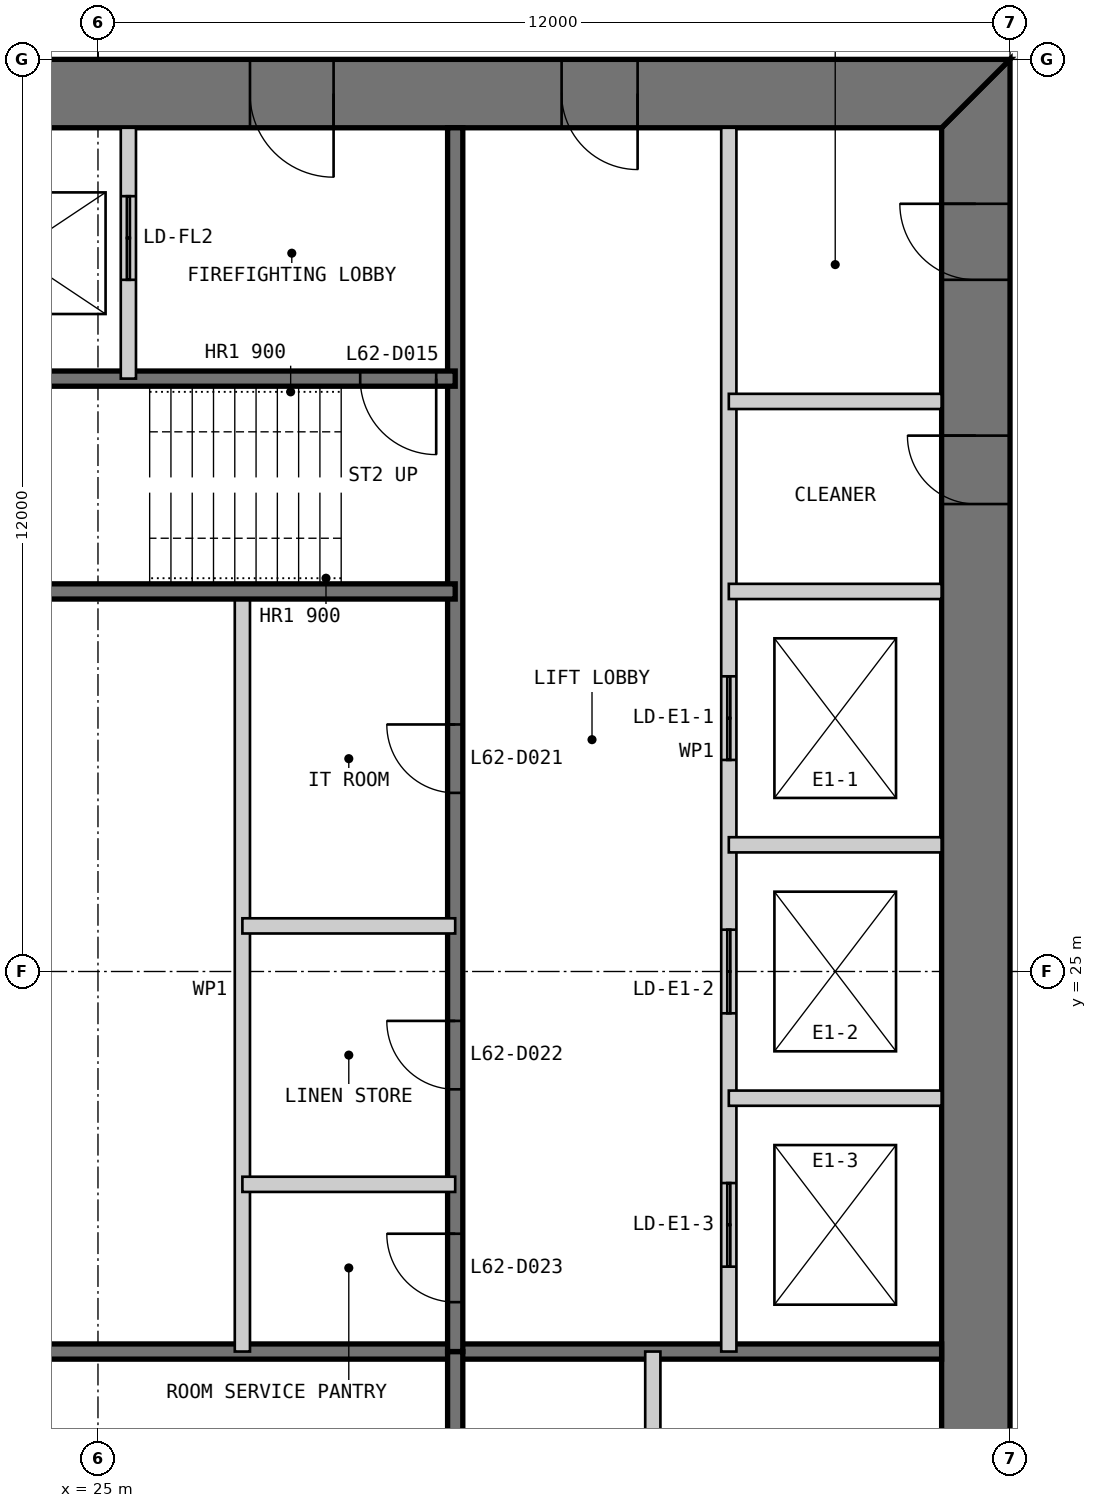
"""IFC4 building model, lengths in metres.
Left out: names, types, materials, properties, quantities, classifications, styles, units other than length and angle.
Written with IfcOpenShell. Run it as: python <this file> out.ifc"""

import sys

from ifc_helpers import new_model, si_unit, direction, frame, frame_2d, origin, place, context, subcontext, project, spatial, polyline, rectangle, outline, extrude, element, fill, save


model = new_model("IFC4")
c1 = context("Model", 3, precision=1e-05, world=origin(), true_north=direction((0.0, 1.0)))
c2 = subcontext(c1, "Body", "Model", "MODEL_VIEW")
j1 = project(units=[si_unit("LENGTHUNIT", "METRE"), si_unit("PLANEANGLEUNIT", "RADIAN")], contexts=[c1])
p1 = place(None, origin())
s1 = spatial("IfcSite", under=j1, at=p1, CompositionType="ELEMENT")
p2 = place(p1, origin())
s2 = spatial("IfcBuilding", under=s1, at=p2, CompositionType="ELEMENT")
p3 = place(p2, frame((0.0, 0.0, 262.8)))
s3 = spatial("IfcBuildingStorey", under=s2, at=p3, CompositionType="ELEMENT", Elevation=262.8)
p4 = place(p3, frame((36.55, 13.9, 0.0), z_axis=(0.0, 0.0, 1.0), x_axis=(0.0, 1.0, 0.0)))
e1 = element("IfcWall", 1, at=p4, inside=s3, PredefinedType="SHEAR", context=c2, shape_type="SweptSolid", body=[
    extrude(outline(polyline([(-0.9, -0.45), (23.1, -0.45), (22.2, 0.45), (0.0, 0.45), (-0.9, -0.45)])), origin(), (0.0, 0.0, 1.0), 3.4),
])
p5 = place(p4, frame((20.2, 0.0, 0.0)))
e2 = element("IfcOpeningElement", 2, at=p5, cuts=e1, PredefinedType="OPENING", context=c2, shape_type="SweptSolid", body=[
    extrude(rectangle(XDim=1.0, YDim=2.2, at=frame_2d((0.5, 1.1))), frame((0.0, 0.46, 0.0), z_axis=(0.0, -1.0, 0.0), x_axis=(1.0, 0.0, 0.0)), (0.0, 0.0, 1.0), 0.92),
])
p6 = place(p4, frame((17.25, 0.0, 0.0)))
e3 = element("IfcOpeningElement", 3, at=p6, cuts=e1, PredefinedType="OPENING", context=c2, shape_type="SweptSolid", body=[
    extrude(rectangle(XDim=0.9, YDim=2.2, at=frame_2d((0.45, 1.1))), frame((0.0, 0.46, 0.0), z_axis=(0.0, -1.0, 0.0), x_axis=(1.0, 0.0, 0.0)), (0.0, 0.0, 1.0), 0.92),
])
p7 = place(p3, frame((37.0, 36.55, 0.0), z_axis=(0.0, 0.0, 1.0), x_axis=(-1.0, 0.0, 0.0)))
e4 = element("IfcWall", 4, at=p7, inside=s3, PredefinedType="SHEAR", context=c2, shape_type="SweptSolid", body=[
    extrude(outline(polyline([(0.0, -0.45), (24.0, -0.45), (23.1, 0.45), (0.9, 0.45), (0.0, -0.45)])), origin(), (0.0, 0.0, 1.0), 3.4),
])
p8 = place(p7, frame((4.9, 0.0, 0.0)))
e5 = element("IfcOpeningElement", 5, at=p8, cuts=e4, PredefinedType="OPENING", context=c2, shape_type="SweptSolid", body=[
    extrude(rectangle(XDim=1.0, YDim=2.2, at=frame_2d((0.5, 1.1))), frame((0.0, 0.46, 0.0), z_axis=(0.0, -1.0, 0.0), x_axis=(1.0, 0.0, 0.0)), (0.0, 0.0, 1.0), 0.92),
])
p9 = place(p7, frame((8.9, 0.0, 0.0)))
e6 = element("IfcOpeningElement", 6, at=p9, cuts=e4, PredefinedType="OPENING", context=c2, shape_type="SweptSolid", body=[
    extrude(rectangle(XDim=1.1, YDim=2.2, at=frame_2d((0.55, 1.1))), frame((0.0, 0.46, 0.0), z_axis=(0.0, -1.0, 0.0), x_axis=(1.0, 0.0, 0.0)), (0.0, 0.0, 1.0), 0.92),
])
p10 = place(p7, frame((15.05, 0.0, 0.0)))
e7 = element("IfcOpeningElement", 7, at=p10, cuts=e4, PredefinedType="OPENING", context=c2, shape_type="SweptSolid", body=[
    extrude(rectangle(XDim=0.9, YDim=2.2, at=frame_2d((0.45, 1.1))), frame((0.0, 0.46, 0.0), z_axis=(0.0, -1.0, 0.0), x_axis=(1.0, 0.0, 0.0)), (0.0, 0.0, 1.0), 0.92),
])
p11 = place(p7, frame((17.9, 0.0, 0.0)))
e8 = element("IfcOpeningElement", 8, at=p11, cuts=e4, PredefinedType="OPENING", context=c2, shape_type="SweptSolid", body=[
    extrude(rectangle(XDim=1.0, YDim=2.2, at=frame_2d((0.5, 1.1))), frame((0.0, 0.46, 0.0), z_axis=(0.0, -1.0, 0.0), x_axis=(1.0, 0.0, 0.0)), (0.0, 0.0, 1.0), 0.92),
])
p12 = place(p7, frame((21.4, 0.0, 0.0)))
e9 = element("IfcOpeningElement", 9, at=p12, cuts=e4, PredefinedType="OPENING", context=c2, shape_type="SweptSolid", body=[
    extrude(rectangle(XDim=1.0, YDim=2.2, at=frame_2d((0.5, 1.1))), frame((0.0, 0.46, 0.0), z_axis=(0.0, -1.0, 0.0), x_axis=(1.0, 0.0, 0.0)), (0.0, 0.0, 1.0), 0.92),
])
p13 = place(p3, frame((20.3, 20.0, 0.0), z_axis=(0.0, 0.0, 1.0), x_axis=(1.0, 0.0, 0.0)))
e10 = element("IfcWall", 10, at=p13, inside=s3, PredefinedType="SOLIDWALL", context=c2, shape_type="SweptSolid", body=[
    extrude(rectangle(XDim=15.8, YDim=0.2, at=frame_2d((7.9, 0.0))), origin(), (0.0, 0.0, 1.0), 3.2),
])
p14 = place(p3, frame((29.7, 13.9, 0.0), z_axis=(0.0, 0.0, 1.0), x_axis=(0.0, 1.0, 0.0)))
e11 = element("IfcWall", 11, at=p14, inside=s3, PredefinedType="SOLIDWALL", context=c2, shape_type="SweptSolid", body=[
    extrude(rectangle(XDim=6.1, YDim=0.2, at=frame_2d((3.05, 0.0))), origin(), (0.0, 0.0, 1.0), 3.2),
])
p15 = place(p3, frame((32.3, 13.9, 0.0), z_axis=(0.0, 0.0, 1.0), x_axis=(0.0, 1.0, 0.0)))
e12 = element("IfcWall", 12, at=p15, inside=s3, PredefinedType="PARTITIONING", context=c2, shape_type="SweptSolid", body=[
    extrude(rectangle(XDim=6.1, YDim=0.2, at=frame_2d((3.05, 0.0))), origin(), (0.0, 0.0, 1.0), 3.2),
])
p16 = place(p3, frame((33.3, 36.1, 0.0), z_axis=(0.0, 0.0, 1.0), x_axis=(0.0, -1.0, 0.0)))
e13 = element("IfcWall", 13, at=p16, inside=s3, PredefinedType="PARTITIONING", context=c2, shape_type="SweptSolid", body=[
    extrude(rectangle(XDim=16.1, YDim=0.2, at=frame_2d((8.05, 0.0))), origin(), (0.0, 0.0, 1.0), 3.2),
])
p17 = place(p16, frame((7.217, 0.0, 0.0)))
e14 = element("IfcOpeningElement", 14, at=p17, cuts=e13, PredefinedType="OPENING", context=c2, shape_type="SweptSolid", body=[
    extrude(rectangle(XDim=1.1, YDim=2.2, at=frame_2d((0.55, 1.1))), frame((0.0, 0.11, 0.0), z_axis=(0.0, -1.0, 0.0), x_axis=(1.0, 0.0, 0.0)), (0.0, 0.0, 1.0), 0.22),
])
p18 = place(p16, frame((10.55, 0.0, 0.0)))
e15 = element("IfcOpeningElement", 15, at=p18, cuts=e13, PredefinedType="OPENING", context=c2, shape_type="SweptSolid", body=[
    extrude(rectangle(XDim=1.1, YDim=2.2, at=frame_2d((0.55, 1.1))), frame((0.0, 0.11, 0.0), z_axis=(0.0, -1.0, 0.0), x_axis=(1.0, 0.0, 0.0)), (0.0, 0.0, 1.0), 0.22),
])
p19 = place(p16, frame((13.883, 0.0, 0.0)))
e16 = element("IfcOpeningElement", 16, at=p19, cuts=e13, PredefinedType="OPENING", context=c2, shape_type="SweptSolid", body=[
    extrude(rectangle(XDim=1.1, YDim=2.2, at=frame_2d((0.55, 1.1))), frame((0.0, 0.11, 0.0), z_axis=(0.0, -1.0, 0.0), x_axis=(1.0, 0.0, 0.0)), (0.0, 0.0, 1.0), 0.22),
])
p20 = place(p3, frame((29.7, 36.1, 0.0), z_axis=(0.0, 0.0, 1.0), x_axis=(0.0, -1.0, 0.0)))
e17 = element("IfcWall", 17, at=p20, inside=s3, PredefinedType="SOLIDWALL", context=c2, shape_type="SweptSolid", body=[
    extrude(rectangle(XDim=16.1, YDim=0.2, at=frame_2d((8.05, 0.0))), origin(), (0.0, 0.0, 1.0), 3.2),
])
p21 = place(p20, frame((7.85, 0.0, 0.0)))
e18 = element("IfcOpeningElement", 18, at=p21, cuts=e17, PredefinedType="OPENING", context=c2, shape_type="SweptSolid", body=[
    extrude(rectangle(XDim=0.9, YDim=2.2, at=frame_2d((0.45, 1.1))), frame((0.0, 0.11, 0.0), z_axis=(0.0, -1.0, 0.0), x_axis=(1.0, 0.0, 0.0)), (0.0, 0.0, 1.0), 0.22),
])
p22 = place(p20, frame((11.75, 0.0, 0.0)))
e19 = element("IfcOpeningElement", 19, at=p22, cuts=e17, PredefinedType="OPENING", context=c2, shape_type="SweptSolid", body=[
    extrude(rectangle(XDim=0.9, YDim=2.2, at=frame_2d((0.45, 1.1))), frame((0.0, 0.11, 0.0), z_axis=(0.0, -1.0, 0.0), x_axis=(1.0, 0.0, 0.0)), (0.0, 0.0, 1.0), 0.22),
])
p23 = place(p20, frame((14.55, 0.0, 0.0)))
e20 = element("IfcOpeningElement", 20, at=p23, cuts=e17, PredefinedType="OPENING", context=c2, shape_type="SweptSolid", body=[
    extrude(rectangle(XDim=0.9, YDim=2.2, at=frame_2d((0.45, 1.1))), frame((0.0, 0.11, 0.0), z_axis=(0.0, -1.0, 0.0), x_axis=(1.0, 0.0, 0.0)), (0.0, 0.0, 1.0), 0.22),
])
for number, where, z_axis, x_axis in (
    (21, (36.1, 30.0, 0.0), (0.0, 0.0, 1.0), (-1.0, 0.0, 0.0)),
    (22, (36.1, 26.667, 0.0), (0.0, 0.0, 1.0), (-1.0, 0.0, 0.0)),
    (23, (36.1, 23.333, 0.0), (0.0, 0.0, 1.0), (-1.0, 0.0, 0.0)),
):
    element("IfcWall", number, at=place(p3, frame(where, z_axis=z_axis, x_axis=x_axis)), inside=s3, PredefinedType="PARTITIONING", context=c2, shape_type="SweptSolid", body=[
        extrude(rectangle(XDim=2.8, YDim=0.2, at=frame_2d((1.4, 0.0))), origin(), (0.0, 0.0, 1.0), 3.2),
    ])
p24 = place(p3, frame((26.9, 30.0, 0.0), z_axis=(0.0, 0.0, 1.0), x_axis=(0.0, -1.0, 0.0)))
e24 = element("IfcWall", 24, at=p24, inside=s3, PredefinedType="PARTITIONING", context=c2, shape_type="SweptSolid", body=[
    extrude(rectangle(XDim=10.0, YDim=0.2, at=frame_2d((5.0, 0.0))), origin(), (0.0, 0.0, 1.0), 3.2),
])
p25 = place(p3, frame((29.7, 32.8, 0.0), z_axis=(0.0, 0.0, 1.0), x_axis=(-1.0, 0.0, 0.0)))
e25 = element("IfcWall", 25, at=p25, inside=s3, PredefinedType="SOLIDWALL", context=c2, shape_type="SweptSolid", body=[
    extrude(rectangle(XDim=9.4, YDim=0.2, at=frame_2d((4.7, 0.0))), origin(), (0.0, 0.0, 1.0), 3.2),
])
p26 = place(p25, frame((0.25, 0.0, 0.0)))
e26 = element("IfcOpeningElement", 26, at=p26, cuts=e25, PredefinedType="OPENING", context=c2, shape_type="SweptSolid", body=[
    extrude(rectangle(XDim=1.0, YDim=2.2, at=frame_2d((0.5, 1.1))), frame((0.0, 0.11, 0.0), z_axis=(0.0, -1.0, 0.0), x_axis=(1.0, 0.0, 0.0)), (0.0, 0.0, 1.0), 0.22),
])
p27 = place(p3, frame((29.7, 30.0, 0.0), z_axis=(0.0, 0.0, 1.0), x_axis=(-1.0, 0.0, 0.0)))
e27 = element("IfcWall", 27, at=p27, inside=s3, PredefinedType="SOLIDWALL", context=c2, shape_type="SweptSolid", body=[
    extrude(rectangle(XDim=15.8, YDim=0.2, at=frame_2d((7.9, 0.0))), origin(), (0.0, 0.0, 1.0), 3.2),
])
p28 = place(p3, frame((25.4, 36.1, 0.0), z_axis=(0.0, 0.0, 1.0), x_axis=(0.0, -1.0, 0.0)))
e28 = element("IfcWall", 28, at=p28, inside=s3, PredefinedType="PARTITIONING", context=c2, shape_type="SweptSolid", body=[
    extrude(rectangle(XDim=3.3, YDim=0.2, at=frame_2d((1.65, 0.0))), origin(), (0.0, 0.0, 1.0), 3.2),
])
p29 = place(p28, frame((0.9, 0.0, 0.0)))
e29 = element("IfcOpeningElement", 29, at=p29, cuts=e28, PredefinedType="OPENING", context=c2, shape_type="SweptSolid", body=[
    extrude(rectangle(XDim=1.1, YDim=2.2, at=frame_2d((0.55, 1.1))), frame((0.0, 0.11, 0.0), z_axis=(0.0, -1.0, 0.0), x_axis=(1.0, 0.0, 0.0)), (0.0, 0.0, 1.0), 0.22),
])
for number, where, z_axis, x_axis in (
    (30, (36.1, 32.5, 0.0), (0.0, 0.0, 1.0), (-1.0, 0.0, 0.0)),
    (31, (29.7, 25.6, 0.0), (0.0, 0.0, 1.0), (-1.0, 0.0, 0.0)),
    (32, (29.7, 22.2, 0.0), (0.0, 0.0, 1.0), (-1.0, 0.0, 0.0)),
):
    element("IfcWall", number, at=place(p3, frame(where, z_axis=z_axis, x_axis=x_axis)), inside=s3, PredefinedType="PARTITIONING", context=c2, shape_type="SweptSolid", body=[
        extrude(rectangle(XDim=2.8, YDim=0.2, at=frame_2d((1.4, 0.0))), origin(), (0.0, 0.0, 1.0), 3.2),
    ])
p30 = place(p8, origin())
e33 = element("IfcDoor", 33, at=p30, inside=s3, OperationType="SINGLE_SWING_LEFT", PredefinedType="DOOR", context=c2, shape_type="SweptSolid", body=[
    extrude(rectangle(XDim=1.0, YDim=2.2, at=frame_2d((0.5, 1.1))), frame((0.0, 0.025, 0.0), z_axis=(0.0, -1.0, 0.0), x_axis=(1.0, 0.0, 0.0)), (0.0, 0.0, 1.0), 0.05),
    extrude(outline(polyline([(0.0, 0.0), (0.04, 0.0), (0.04, 2.16), (0.96, 2.16), (0.96, 0.0), (1.0, 0.0), (1.0, 2.2), (0.0, 2.2), (0.0, 0.0)])), frame((0.0, 0.3, 0.0), z_axis=(0.0, -1.0, 0.0), x_axis=(1.0, 0.0, 0.0)), (0.0, 0.0, 1.0), 0.6),
])
fill(e5, e33)
p31 = place(p9, origin())
e34 = element("IfcDoor", 34, at=p31, inside=s3, OperationType="SINGLE_SWING_LEFT", PredefinedType="DOOR", context=c2, shape_type="SweptSolid", body=[
    extrude(rectangle(XDim=1.1, YDim=2.2, at=frame_2d((0.55, 1.1))), frame((0.0, 0.025, 0.0), z_axis=(0.0, -1.0, 0.0), x_axis=(1.0, 0.0, 0.0)), (0.0, 0.0, 1.0), 0.05),
    extrude(outline(polyline([(0.0, 0.0), (0.04, 0.0), (0.04, 2.16), (1.06, 2.16), (1.06, 0.0), (1.1, 0.0), (1.1, 2.2), (0.0, 2.2), (0.0, 0.0)])), frame((0.0, 0.3, 0.0), z_axis=(0.0, -1.0, 0.0), x_axis=(1.0, 0.0, 0.0)), (0.0, 0.0, 1.0), 0.6),
])
fill(e6, e34)
p32 = place(p26, origin())
e35 = element("IfcDoor", 35, at=p32, inside=s3, OperationType="SINGLE_SWING_LEFT", PredefinedType="DOOR", context=c2, shape_type="SweptSolid", body=[
    extrude(rectangle(XDim=1.0, YDim=2.2, at=frame_2d((0.5, 1.1))), frame((0.0, 0.025, 0.0), z_axis=(0.0, -1.0, 0.0), x_axis=(1.0, 0.0, 0.0)), (0.0, 0.0, 1.0), 0.05),
])
fill(e26, e35)
p33 = place(p5, origin())
e36 = element("IfcDoor", 36, at=p33, inside=s3, OperationType="SINGLE_SWING_RIGHT", PredefinedType="DOOR", context=c2, shape_type="SweptSolid", body=[
    extrude(rectangle(XDim=1.0, YDim=2.2, at=frame_2d((0.5, 1.1))), frame((0.0, 0.025, 0.0), z_axis=(0.0, -1.0, 0.0), x_axis=(1.0, 0.0, 0.0)), (0.0, 0.0, 1.0), 0.05),
    extrude(outline(polyline([(0.0, 0.0), (0.04, 0.0), (0.04, 2.16), (0.96, 2.16), (0.96, 0.0), (1.0, 0.0), (1.0, 2.2), (0.0, 2.2), (0.0, 0.0)])), frame((0.0, 0.3, 0.0), z_axis=(0.0, -1.0, 0.0), x_axis=(1.0, 0.0, 0.0)), (0.0, 0.0, 1.0), 0.6),
])
fill(e2, e36)
p34 = place(p6, origin())
e37 = element("IfcDoor", 37, at=p34, inside=s3, OperationType="SINGLE_SWING_RIGHT", PredefinedType="DOOR", context=c2, shape_type="SweptSolid", body=[
    extrude(rectangle(XDim=0.9, YDim=2.2, at=frame_2d((0.45, 1.1))), frame((0.0, 0.025, 0.0), z_axis=(0.0, -1.0, 0.0), x_axis=(1.0, 0.0, 0.0)), (0.0, 0.0, 1.0), 0.05),
    extrude(outline(polyline([(0.0, 0.0), (0.04, 0.0), (0.04, 2.16), (0.86, 2.16), (0.86, 0.0), (0.9, 0.0), (0.9, 2.2), (0.0, 2.2), (0.0, 0.0)])), frame((0.0, 0.3, 0.0), z_axis=(0.0, -1.0, 0.0), x_axis=(1.0, 0.0, 0.0)), (0.0, 0.0, 1.0), 0.6),
])
fill(e3, e37)
p35 = place(p21, frame((0.9, 0.0, 0.0), z_axis=(0.0, 0.0, 1.0), x_axis=(-1.0, 0.0, 0.0)))
e38 = element("IfcDoor", 38, at=p35, inside=s3, OperationType="SINGLE_SWING_RIGHT", PredefinedType="DOOR", context=c2, shape_type="SweptSolid", body=[
    extrude(rectangle(XDim=0.9, YDim=2.2, at=frame_2d((0.45, 1.1))), frame((0.0, 0.025, 0.0), z_axis=(0.0, -1.0, 0.0), x_axis=(1.0, 0.0, 0.0)), (0.0, 0.0, 1.0), 0.05),
])
fill(e18, e38)
p36 = place(p22, frame((0.9, 0.0, 0.0), z_axis=(0.0, 0.0, 1.0), x_axis=(-1.0, 0.0, 0.0)))
e39 = element("IfcDoor", 39, at=p36, inside=s3, OperationType="SINGLE_SWING_RIGHT", PredefinedType="DOOR", context=c2, shape_type="SweptSolid", body=[
    extrude(rectangle(XDim=0.9, YDim=2.2, at=frame_2d((0.45, 1.1))), frame((0.0, 0.025, 0.0), z_axis=(0.0, -1.0, 0.0), x_axis=(1.0, 0.0, 0.0)), (0.0, 0.0, 1.0), 0.05),
])
fill(e19, e39)
p37 = place(p23, frame((0.9, 0.0, 0.0), z_axis=(0.0, 0.0, 1.0), x_axis=(-1.0, 0.0, 0.0)))
e40 = element("IfcDoor", 40, at=p37, inside=s3, OperationType="SINGLE_SWING_RIGHT", PredefinedType="DOOR", context=c2, shape_type="SweptSolid", body=[
    extrude(rectangle(XDim=0.9, YDim=2.2, at=frame_2d((0.45, 1.1))), frame((0.0, 0.025, 0.0), z_axis=(0.0, -1.0, 0.0), x_axis=(1.0, 0.0, 0.0)), (0.0, 0.0, 1.0), 0.05),
])
fill(e20, e40)
p38 = place(p29, origin())
e41 = element("IfcDoor", 41, at=p38, inside=s3, OperationType="DOUBLE_DOOR_SLIDING", PredefinedType="DOOR", context=c2, shape_type="SweptSolid", body=[
    extrude(rectangle(XDim=1.1, YDim=2.2, at=frame_2d((0.55, 1.1))), frame((0.0, 0.025, 0.0), z_axis=(0.0, -1.0, 0.0), x_axis=(1.0, 0.0, 0.0)), (0.0, 0.0, 1.0), 0.05),
])
fill(e29, e41)
p39 = place(p17, origin())
e42 = element("IfcDoor", 42, at=p39, inside=s3, OperationType="DOUBLE_DOOR_SLIDING", PredefinedType="DOOR", context=c2, shape_type="SweptSolid", body=[
    extrude(rectangle(XDim=1.1, YDim=2.2, at=frame_2d((0.55, 1.1))), frame((0.0, 0.025, 0.0), z_axis=(0.0, -1.0, 0.0), x_axis=(1.0, 0.0, 0.0)), (0.0, 0.0, 1.0), 0.05),
])
fill(e14, e42)
p40 = place(p18, origin())
e43 = element("IfcDoor", 43, at=p40, inside=s3, OperationType="DOUBLE_DOOR_SLIDING", PredefinedType="DOOR", context=c2, shape_type="SweptSolid", body=[
    extrude(rectangle(XDim=1.1, YDim=2.2, at=frame_2d((0.55, 1.1))), frame((0.0, 0.025, 0.0), z_axis=(0.0, -1.0, 0.0), x_axis=(1.0, 0.0, 0.0)), (0.0, 0.0, 1.0), 0.05),
])
fill(e15, e43)
p41 = place(p19, origin())
e44 = element("IfcDoor", 44, at=p41, inside=s3, OperationType="DOUBLE_DOOR_SLIDING", PredefinedType="DOOR", context=c2, shape_type="SweptSolid", body=[
    extrude(rectangle(XDim=1.1, YDim=2.2, at=frame_2d((0.55, 1.1))), frame((0.0, 0.025, 0.0), z_axis=(0.0, -1.0, 0.0), x_axis=(1.0, 0.0, 0.0)), (0.0, 0.0, 1.0), 0.05),
])
fill(e16, e44)
save(model, sys.argv[1])
